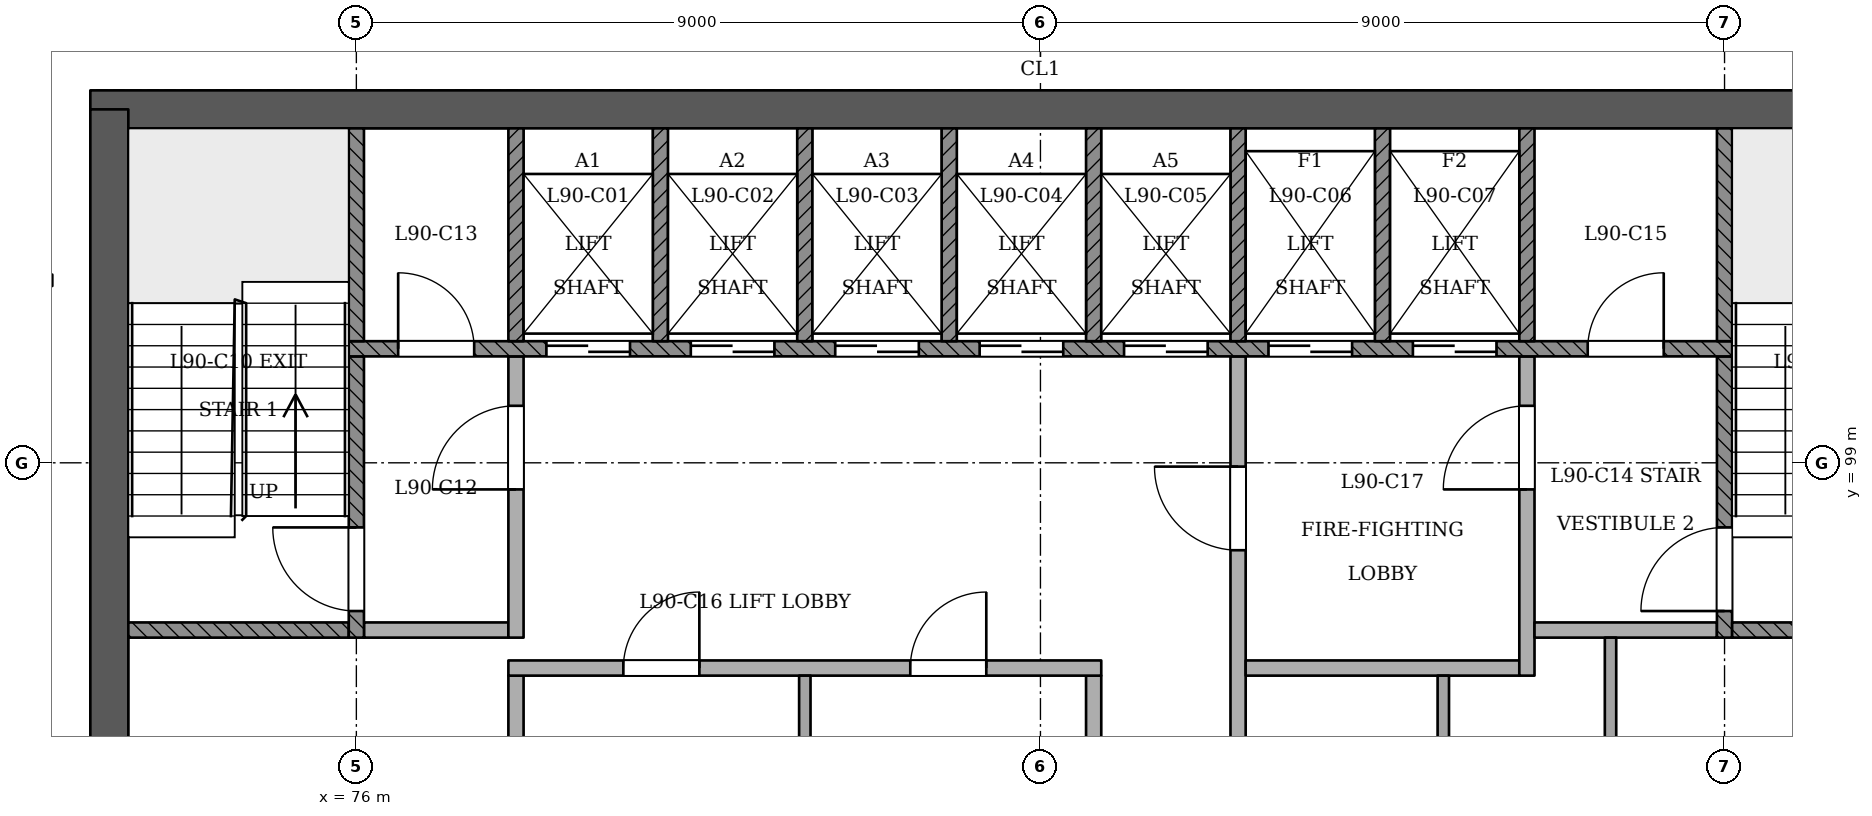
"""IFC4 building model, lengths in metres.
Left out: names, types, materials, properties, quantities, classifications, styles, units other than length and angle.
Written with IfcOpenShell. Run it as: python <this file> out.ifc"""

import sys

from ifc_helpers import new_model, si_unit, direction, frame, frame_2d, origin, place, context, subcontext, project, spatial, rectangle, extrude, element, fill, save


model = new_model("IFC4")
c1 = context("Model", 3, precision=1e-05, world=origin(), true_north=direction((0.0, 1.0)))
c2 = subcontext(c1, "Body", "Model", "MODEL_VIEW")
j1 = project(units=[si_unit("LENGTHUNIT", "METRE"), si_unit("PLANEANGLEUNIT", "RADIAN")], contexts=[c1])
p1 = place(None, origin())
s1 = spatial("IfcSite", under=j1, at=p1, CompositionType="ELEMENT")
p2 = place(p1, origin())
s2 = spatial("IfcBuilding", under=s1, at=p2, CompositionType="ELEMENT")
p3 = place(p2, frame((0.0, 0.0, 347.2)))
s3 = spatial("IfcBuildingStorey", under=s2, at=p3, CompositionType="ELEMENT", Elevation=347.2)
p4 = place(p3, frame((97.25, 103.65, 0.0), z_axis=(0.0, 0.0, 1.0), x_axis=(-1.0, 0.0, 0.0)))
e1 = element("IfcWall", 1, at=p4, inside=s3, PredefinedType="SHEAR", context=c2, shape_type="SweptSolid", body=[
    extrude(rectangle(XDim=24.75, YDim=0.5, at=frame_2d((12.375, 0.0))), origin(), (0.0, 0.0, 1.0), 3.6),
])
p5 = place(p3, frame((72.75, 103.65, 0.0), z_axis=(0.0, 0.0, 1.0), x_axis=(0.0, -1.0, 0.0)))
e2 = element("IfcWall", 2, at=p5, inside=s3, PredefinedType="SHEAR", context=c2, shape_type="SweptSolid", body=[
    extrude(rectangle(XDim=10.75, YDim=0.5, at=frame_2d((5.375, 0.0))), origin(), (0.0, 0.0, 1.0), 3.6),
])
p6 = place(p3, frame((78.1, 93.4, 0.0), z_axis=(0.0, 0.0, 1.0), x_axis=(0.0, 1.0, 0.0)))
e3 = element("IfcWall", 3, at=p6, inside=s3, PredefinedType="PARTITIONING", context=c2, shape_type="SweptSolid", body=[
    extrude(rectangle(XDim=2.8, YDim=0.2, at=frame_2d((1.4, 0.0))), origin(), (0.0, 0.0, 1.0), 3.2),
])
p7 = place(p3, frame((81.9, 93.4, 0.0), z_axis=(0.0, 0.0, 1.0), x_axis=(0.0, 1.0, 0.0)))
e4 = element("IfcWall", 4, at=p7, inside=s3, PredefinedType="PARTITIONING", context=c2, shape_type="SweptSolid", body=[
    extrude(rectangle(XDim=2.8, YDim=0.15, at=frame_2d((1.4, 0.0))), origin(), (0.0, 0.0, 1.0), 3.2),
])
p8 = place(p3, frame((85.7, 93.4, 0.0), z_axis=(0.0, 0.0, 1.0), x_axis=(0.0, 1.0, 0.0)))
e5 = element("IfcWall", 5, at=p8, inside=s3, PredefinedType="PARTITIONING", context=c2, shape_type="SweptSolid", body=[
    extrude(rectangle(XDim=2.8, YDim=0.2, at=frame_2d((1.4, 0.0))), origin(), (0.0, 0.0, 1.0), 3.2),
])
p9 = place(p3, frame((87.6, 93.4, 0.0), z_axis=(0.0, 0.0, 1.0), x_axis=(0.0, 1.0, 0.0)))
e6 = element("IfcWall", 6, at=p9, inside=s3, PredefinedType="PARTITIONING", context=c2, shape_type="SweptSolid", body=[
    extrude(rectangle(XDim=7.0, YDim=0.2, at=frame_2d((3.5, 0.0))), origin(), (0.0, 0.0, 1.0), 3.2),
])
p10 = place(p9, frame((4.45, 0.0, 0.0)))
e7 = element("IfcOpeningElement", 7, at=p10, cuts=e6, PredefinedType="OPENING", context=c2, shape_type="SweptSolid", body=[
    extrude(rectangle(XDim=1.1, YDim=2.1, at=frame_2d((0.55, 1.05))), frame((0.0, 0.11, 0.0), z_axis=(0.0, -1.0, 0.0), x_axis=(1.0, 0.0, 0.0)), (0.0, 0.0, 1.0), 0.221),
])
p11 = place(p3, frame((90.3, 93.4, 0.0), z_axis=(0.0, 0.0, 1.0), x_axis=(0.0, 1.0, 0.0)))
e8 = element("IfcWall", 8, at=p11, inside=s3, PredefinedType="PARTITIONING", context=c2, shape_type="SweptSolid", body=[
    extrude(rectangle(XDim=2.8, YDim=0.15, at=frame_2d((1.4, 0.0))), origin(), (0.0, 0.0, 1.0), 3.2),
])
p12 = place(p3, frame((92.5, 93.4, 0.0), z_axis=(0.0, 0.0, 1.0), x_axis=(0.0, 1.0, 0.0)))
e9 = element("IfcWall", 9, at=p12, inside=s3, PredefinedType="PARTITIONING", context=c2, shape_type="SweptSolid", body=[
    extrude(rectangle(XDim=3.3, YDim=0.15, at=frame_2d((1.65, 0.0))), origin(), (0.0, 0.0, 1.0), 3.2),
])
p13 = place(p3, frame((78.0, 96.3, 0.0), z_axis=(0.0, 0.0, 1.0), x_axis=(1.0, 0.0, 0.0)))
e10 = element("IfcWall", 10, at=p13, inside=s3, PredefinedType="PARTITIONING", context=c2, shape_type="SweptSolid", body=[
    extrude(rectangle(XDim=7.8, YDim=0.2, at=frame_2d((3.9, 0.0))), origin(), (0.0, 0.0, 1.0), 3.2),
])
p14 = place(p13, frame((1.512, 0.0, 0.0)))
e11 = element("IfcOpeningElement", 11, at=p14, cuts=e10, PredefinedType="OPENING", context=c2, shape_type="SweptSolid", body=[
    extrude(rectangle(XDim=1.0, YDim=2.1, at=frame_2d((0.5, 1.05))), frame((0.0, 0.11, 0.0), z_axis=(0.0, -1.0, 0.0), x_axis=(1.0, 0.0, 0.0)), (0.0, 0.0, 1.0), 0.221),
])
p15 = place(p13, frame((5.288, 0.0, 0.0)))
e12 = element("IfcOpeningElement", 12, at=p15, cuts=e10, PredefinedType="OPENING", context=c2, shape_type="SweptSolid", body=[
    extrude(rectangle(XDim=1.0, YDim=2.1, at=frame_2d((0.5, 1.05))), frame((0.0, 0.11, 0.0), z_axis=(0.0, -1.0, 0.0), x_axis=(1.0, 0.0, 0.0)), (0.0, 0.0, 1.0), 0.221),
])
p16 = place(p3, frame((87.7, 96.3, 0.0), z_axis=(0.0, 0.0, 1.0), x_axis=(1.0, 0.0, 0.0)))
e13 = element("IfcWall", 13, at=p16, inside=s3, PredefinedType="PARTITIONING", context=c2, shape_type="SweptSolid", body=[
    extrude(rectangle(XDim=3.6, YDim=0.2, at=frame_2d((1.8, 0.0))), origin(), (0.0, 0.0, 1.0), 3.2),
])
p17 = place(p3, frame((91.4, 96.2, 0.0), z_axis=(0.0, 0.0, 1.0), x_axis=(0.0, 1.0, 0.0)))
e14 = element("IfcWall", 14, at=p17, inside=s3, PredefinedType="PARTITIONING", context=c2, shape_type="SweptSolid", body=[
    extrude(rectangle(XDim=4.2, YDim=0.2, at=frame_2d((2.1, 0.0))), origin(), (0.0, 0.0, 1.0), 3.2),
])
p18 = place(p17, frame((2.45, 0.0, 0.0)))
e15 = element("IfcOpeningElement", 15, at=p18, cuts=e14, PredefinedType="OPENING", context=c2, shape_type="SweptSolid", body=[
    extrude(rectangle(XDim=1.1, YDim=2.1, at=frame_2d((0.55, 1.05))), frame((0.0, 0.11, 0.0), z_axis=(0.0, -1.0, 0.0), x_axis=(1.0, 0.0, 0.0)), (0.0, 0.0, 1.0), 0.221),
])
p19 = place(p3, frame((73.0, 96.8, 0.0), z_axis=(0.0, 0.0, 1.0), x_axis=(1.0, 0.0, 0.0)))
e16 = element("IfcWall", 16, at=p19, inside=s3, PredefinedType="SOLIDWALL", context=c2, shape_type="SweptSolid", body=[
    extrude(rectangle(XDim=2.9, YDim=0.2, at=frame_2d((1.45, 0.0))), origin(), (0.0, 0.0, 1.0), 3.2),
])
p20 = place(p3, frame((76.0, 96.7, 0.0), z_axis=(0.0, 0.0, 1.0), x_axis=(0.0, 1.0, 0.0)))
e17 = element("IfcWall", 17, at=p20, inside=s3, PredefinedType="SOLIDWALL", context=c2, shape_type="SweptSolid", body=[
    extrude(rectangle(XDim=3.7, YDim=0.2, at=frame_2d((1.85, 0.0))), origin(), (0.0, 0.0, 1.0), 3.2),
])
p21 = place(p20, frame((0.35, 0.0, 0.0)))
e18 = element("IfcOpeningElement", 18, at=p21, cuts=e17, PredefinedType="OPENING", context=c2, shape_type="SweptSolid", body=[
    extrude(rectangle(XDim=1.1, YDim=2.1, at=frame_2d((0.55, 1.05))), frame((0.0, 0.11, 0.0), z_axis=(0.0, -1.0, 0.0), x_axis=(1.0, 0.0, 0.0)), (0.0, 0.0, 1.0), 0.221),
])
p22 = place(p3, frame((76.1, 96.8, 0.0), z_axis=(0.0, 0.0, 1.0), x_axis=(1.0, 0.0, 0.0)))
e19 = element("IfcWall", 19, at=p22, inside=s3, PredefinedType="PARTITIONING", context=c2, shape_type="SweptSolid", body=[
    extrude(rectangle(XDim=1.9, YDim=0.2, at=frame_2d((0.95, 0.0))), origin(), (0.0, 0.0, 1.0), 3.2),
])
p23 = place(p3, frame((78.1, 96.7, 0.0), z_axis=(0.0, 0.0, 1.0), x_axis=(0.0, 1.0, 0.0)))
e20 = element("IfcWall", 20, at=p23, inside=s3, PredefinedType="PARTITIONING", context=c2, shape_type="SweptSolid", body=[
    extrude(rectangle(XDim=3.7, YDim=0.2, at=frame_2d((1.85, 0.0))), origin(), (0.0, 0.0, 1.0), 3.2),
])
p24 = place(p23, frame((1.95, 0.0, 0.0)))
e21 = element("IfcOpeningElement", 21, at=p24, cuts=e20, PredefinedType="OPENING", context=c2, shape_type="SweptSolid", body=[
    extrude(rectangle(XDim=1.1, YDim=2.1, at=frame_2d((0.55, 1.05))), frame((0.0, 0.11, 0.0), z_axis=(0.0, -1.0, 0.0), x_axis=(1.0, 0.0, 0.0)), (0.0, 0.0, 1.0), 0.221),
])
p25 = place(p3, frame((91.5, 96.8, 0.0), z_axis=(0.0, 0.0, 1.0), x_axis=(1.0, 0.0, 0.0)))
e22 = element("IfcWall", 22, at=p25, inside=s3, PredefinedType="PARTITIONING", context=c2, shape_type="SweptSolid", body=[
    extrude(rectangle(XDim=2.4, YDim=0.2, at=frame_2d((1.2, 0.0))), origin(), (0.0, 0.0, 1.0), 3.2),
])
p26 = place(p3, frame((94.0, 96.7, 0.0), z_axis=(0.0, 0.0, 1.0), x_axis=(0.0, 1.0, 0.0)))
e23 = element("IfcWall", 23, at=p26, inside=s3, PredefinedType="SOLIDWALL", context=c2, shape_type="SweptSolid", body=[
    extrude(rectangle(XDim=3.7, YDim=0.2, at=frame_2d((1.85, 0.0))), origin(), (0.0, 0.0, 1.0), 3.2),
])
p27 = place(p26, frame((0.35, 0.0, 0.0)))
e24 = element("IfcOpeningElement", 24, at=p27, cuts=e23, PredefinedType="OPENING", context=c2, shape_type="SweptSolid", body=[
    extrude(rectangle(XDim=1.1, YDim=2.1, at=frame_2d((0.55, 1.05))), frame((0.0, 0.11, 0.0), z_axis=(0.0, -1.0, 0.0), x_axis=(1.0, 0.0, 0.0)), (0.0, 0.0, 1.0), 0.221),
])
p28 = place(p3, frame((94.1, 96.8, 0.0), z_axis=(0.0, 0.0, 1.0), x_axis=(1.0, 0.0, 0.0)))
e25 = element("IfcWall", 25, at=p28, inside=s3, PredefinedType="SOLIDWALL", context=c2, shape_type="SweptSolid", body=[
    extrude(rectangle(XDim=2.9, YDim=0.2, at=frame_2d((1.45, 0.0))), origin(), (0.0, 0.0, 1.0), 3.2),
])
p29 = place(p3, frame((75.9, 100.5, 0.0), z_axis=(0.0, 0.0, 1.0), x_axis=(1.0, 0.0, 0.0)))
e26 = element("IfcWall", 26, at=p29, inside=s3, PredefinedType="SOLIDWALL", context=c2, shape_type="SweptSolid", body=[
    extrude(rectangle(XDim=18.2, YDim=0.2, at=frame_2d((9.1, 0.0))), origin(), (0.0, 0.0, 1.0), 3.2),
])
p30 = place(p29, frame((2.6, 0.0, 0.0)))
e27 = element("IfcOpeningElement", 27, at=p30, cuts=e26, PredefinedType="OPENING", context=c2, shape_type="SweptSolid", body=[
    extrude(rectangle(XDim=1.1, YDim=2.1, at=frame_2d((0.55, 1.05))), frame((0.0, 0.11, 0.0), z_axis=(0.0, -1.0, 0.0), x_axis=(1.0, 0.0, 0.0)), (0.0, 0.0, 1.0), 0.221),
])
p31 = place(p29, frame((4.5, 0.0, 0.0)))
e28 = element("IfcOpeningElement", 28, at=p31, cuts=e26, PredefinedType="OPENING", context=c2, shape_type="SweptSolid", body=[
    extrude(rectangle(XDim=1.1, YDim=2.1, at=frame_2d((0.55, 1.05))), frame((0.0, 0.11, 0.0), z_axis=(0.0, -1.0, 0.0), x_axis=(1.0, 0.0, 0.0)), (0.0, 0.0, 1.0), 0.221),
])
p32 = place(p29, frame((6.4, 0.0, 0.0)))
e29 = element("IfcOpeningElement", 29, at=p32, cuts=e26, PredefinedType="OPENING", context=c2, shape_type="SweptSolid", body=[
    extrude(rectangle(XDim=1.1, YDim=2.1, at=frame_2d((0.55, 1.05))), frame((0.0, 0.11, 0.0), z_axis=(0.0, -1.0, 0.0), x_axis=(1.0, 0.0, 0.0)), (0.0, 0.0, 1.0), 0.221),
])
p33 = place(p29, frame((8.3, 0.0, 0.0)))
e30 = element("IfcOpeningElement", 30, at=p33, cuts=e26, PredefinedType="OPENING", context=c2, shape_type="SweptSolid", body=[
    extrude(rectangle(XDim=1.1, YDim=2.1, at=frame_2d((0.55, 1.05))), frame((0.0, 0.11, 0.0), z_axis=(0.0, -1.0, 0.0), x_axis=(1.0, 0.0, 0.0)), (0.0, 0.0, 1.0), 0.221),
])
p34 = place(p29, frame((10.2, 0.0, 0.0)))
e31 = element("IfcOpeningElement", 31, at=p34, cuts=e26, PredefinedType="OPENING", context=c2, shape_type="SweptSolid", body=[
    extrude(rectangle(XDim=1.1, YDim=2.1, at=frame_2d((0.55, 1.05))), frame((0.0, 0.11, 0.0), z_axis=(0.0, -1.0, 0.0), x_axis=(1.0, 0.0, 0.0)), (0.0, 0.0, 1.0), 0.221),
])
p35 = place(p29, frame((12.1, 0.0, 0.0)))
e32 = element("IfcOpeningElement", 32, at=p35, cuts=e26, PredefinedType="OPENING", context=c2, shape_type="SweptSolid", body=[
    extrude(rectangle(XDim=1.1, YDim=2.1, at=frame_2d((0.55, 1.05))), frame((0.0, 0.11, 0.0), z_axis=(0.0, -1.0, 0.0), x_axis=(1.0, 0.0, 0.0)), (0.0, 0.0, 1.0), 0.221),
])
p36 = place(p29, frame((14.0, 0.0, 0.0)))
e33 = element("IfcOpeningElement", 33, at=p36, cuts=e26, PredefinedType="OPENING", context=c2, shape_type="SweptSolid", body=[
    extrude(rectangle(XDim=1.1, YDim=2.1, at=frame_2d((0.55, 1.05))), frame((0.0, 0.11, 0.0), z_axis=(0.0, -1.0, 0.0), x_axis=(1.0, 0.0, 0.0)), (0.0, 0.0, 1.0), 0.221),
])
p37 = place(p29, frame((0.65, 0.0, 0.0)))
e34 = element("IfcOpeningElement", 34, at=p37, cuts=e26, PredefinedType="OPENING", context=c2, shape_type="SweptSolid", body=[
    extrude(rectangle(XDim=1.0, YDim=2.1, at=frame_2d((0.5, 1.05))), frame((0.0, 0.11, 0.0), z_axis=(0.0, -1.0, 0.0), x_axis=(1.0, 0.0, 0.0)), (0.0, 0.0, 1.0), 0.221),
])
p38 = place(p29, frame((16.3, 0.0, 0.0)))
e35 = element("IfcOpeningElement", 35, at=p38, cuts=e26, PredefinedType="OPENING", context=c2, shape_type="SweptSolid", body=[
    extrude(rectangle(XDim=1.0, YDim=2.1, at=frame_2d((0.5, 1.05))), frame((0.0, 0.11, 0.0), z_axis=(0.0, -1.0, 0.0), x_axis=(1.0, 0.0, 0.0)), (0.0, 0.0, 1.0), 0.221),
])
for number, where, z_axis, x_axis in (
    (36, (76.0, 100.6, 0.0), (0.0, 0.0, 1.0), (0.0, 1.0, 0.0)),
    (37, (78.1, 100.6, 0.0), (0.0, 0.0, 1.0), (0.0, 1.0, 0.0)),
    (38, (80.0, 100.6, 0.0), (0.0, 0.0, 1.0), (0.0, 1.0, 0.0)),
    (39, (81.9, 100.6, 0.0), (0.0, 0.0, 1.0), (0.0, 1.0, 0.0)),
    (40, (83.8, 100.6, 0.0), (0.0, 0.0, 1.0), (0.0, 1.0, 0.0)),
    (41, (85.7, 100.6, 0.0), (0.0, 0.0, 1.0), (0.0, 1.0, 0.0)),
    (42, (87.6, 100.6, 0.0), (0.0, 0.0, 1.0), (0.0, 1.0, 0.0)),
    (43, (89.5, 100.6, 0.0), (0.0, 0.0, 1.0), (0.0, 1.0, 0.0)),
    (44, (91.4, 100.6, 0.0), (0.0, 0.0, 1.0), (0.0, 1.0, 0.0)),
    (45, (94.0, 100.6, 0.0), (0.0, 0.0, 1.0), (0.0, 1.0, 0.0)),
):
    element("IfcWall", number, at=place(p3, frame(where, z_axis=z_axis, x_axis=x_axis)), inside=s3, PredefinedType="SOLIDWALL", context=c2, shape_type="SweptSolid", body=[
        extrude(rectangle(XDim=2.8, YDim=0.2, at=frame_2d((1.4, 0.0))), origin(), (0.0, 0.0, 1.0), 3.2),
    ])
p39 = place(p30, origin())
e46 = element("IfcDoor", 46, at=p39, inside=s3, OperationType="SLIDING_TO_RIGHT", PredefinedType="NOTDEFINED", context=c2, shape_type="SweptSolid", body=[
    extrude(rectangle(XDim=1.1, YDim=2.1, at=frame_2d((0.55, 1.05))), frame((0.0, 0.025, 0.0), z_axis=(0.0, -1.0, 0.0), x_axis=(1.0, 0.0, 0.0)), (0.0, 0.0, 1.0), 0.05),
])
fill(e27, e46)
p40 = place(p31, origin())
e47 = element("IfcDoor", 47, at=p40, inside=s3, OperationType="SLIDING_TO_LEFT", PredefinedType="NOTDEFINED", context=c2, shape_type="SweptSolid", body=[
    extrude(rectangle(XDim=1.1, YDim=2.1, at=frame_2d((0.55, 1.05))), frame((0.0, 0.025, 0.0), z_axis=(0.0, -1.0, 0.0), x_axis=(1.0, 0.0, 0.0)), (0.0, 0.0, 1.0), 0.05),
])
fill(e28, e47)
p41 = place(p32, origin())
e48 = element("IfcDoor", 48, at=p41, inside=s3, OperationType="SLIDING_TO_RIGHT", PredefinedType="NOTDEFINED", context=c2, shape_type="SweptSolid", body=[
    extrude(rectangle(XDim=1.1, YDim=2.1, at=frame_2d((0.55, 1.05))), frame((0.0, 0.025, 0.0), z_axis=(0.0, -1.0, 0.0), x_axis=(1.0, 0.0, 0.0)), (0.0, 0.0, 1.0), 0.05),
])
fill(e29, e48)
p42 = place(p33, origin())
e49 = element("IfcDoor", 49, at=p42, inside=s3, OperationType="SLIDING_TO_LEFT", PredefinedType="NOTDEFINED", context=c2, shape_type="SweptSolid", body=[
    extrude(rectangle(XDim=1.1, YDim=2.1, at=frame_2d((0.55, 1.05))), frame((0.0, 0.025, 0.0), z_axis=(0.0, -1.0, 0.0), x_axis=(1.0, 0.0, 0.0)), (0.0, 0.0, 1.0), 0.05),
])
fill(e30, e49)
p43 = place(p34, origin())
e50 = element("IfcDoor", 50, at=p43, inside=s3, OperationType="SLIDING_TO_RIGHT", PredefinedType="NOTDEFINED", context=c2, shape_type="SweptSolid", body=[
    extrude(rectangle(XDim=1.1, YDim=2.1, at=frame_2d((0.55, 1.05))), frame((0.0, 0.025, 0.0), z_axis=(0.0, -1.0, 0.0), x_axis=(1.0, 0.0, 0.0)), (0.0, 0.0, 1.0), 0.05),
])
fill(e31, e50)
p44 = place(p35, origin())
e51 = element("IfcDoor", 51, at=p44, inside=s3, OperationType="SLIDING_TO_RIGHT", PredefinedType="NOTDEFINED", context=c2, shape_type="SweptSolid", body=[
    extrude(rectangle(XDim=1.1, YDim=2.1, at=frame_2d((0.55, 1.05))), frame((0.0, 0.025, 0.0), z_axis=(0.0, -1.0, 0.0), x_axis=(1.0, 0.0, 0.0)), (0.0, 0.0, 1.0), 0.05),
])
fill(e32, e51)
p45 = place(p36, origin())
e52 = element("IfcDoor", 52, at=p45, inside=s3, OperationType="SLIDING_TO_LEFT", PredefinedType="NOTDEFINED", context=c2, shape_type="SweptSolid", body=[
    extrude(rectangle(XDim=1.1, YDim=2.1, at=frame_2d((0.55, 1.05))), frame((0.0, 0.025, 0.0), z_axis=(0.0, -1.0, 0.0), x_axis=(1.0, 0.0, 0.0)), (0.0, 0.0, 1.0), 0.05),
])
fill(e33, e52)
p46 = place(p21, origin())
e53 = element("IfcDoor", 53, at=p46, inside=s3, OperationType="SINGLE_SWING_RIGHT", PredefinedType="NOTDEFINED", context=c2, shape_type="SweptSolid", body=[
    extrude(rectangle(XDim=1.1, YDim=2.1, at=frame_2d((0.55, 1.05))), frame((0.0, 0.025, 0.0), z_axis=(0.0, -1.0, 0.0), x_axis=(1.0, 0.0, 0.0)), (0.0, 0.0, 1.0), 0.05),
])
fill(e18, e53)
p47 = place(p27, origin())
e54 = element("IfcDoor", 54, at=p47, inside=s3, OperationType="SINGLE_SWING_LEFT", PredefinedType="NOTDEFINED", context=c2, shape_type="SweptSolid", body=[
    extrude(rectangle(XDim=1.1, YDim=2.1, at=frame_2d((0.55, 1.05))), frame((0.0, 0.025, 0.0), z_axis=(0.0, -1.0, 0.0), x_axis=(1.0, 0.0, 0.0)), (0.0, 0.0, 1.0), 0.05),
])
fill(e24, e54)
p48 = place(p24, origin())
e55 = element("IfcDoor", 55, at=p48, inside=s3, OperationType="SINGLE_SWING_LEFT", PredefinedType="NOTDEFINED", context=c2, shape_type="SweptSolid", body=[
    extrude(rectangle(XDim=1.1, YDim=2.1, at=frame_2d((0.55, 1.05))), frame((0.0, 0.025, 0.0), z_axis=(0.0, -1.0, 0.0), x_axis=(1.0, 0.0, 0.0)), (0.0, 0.0, 1.0), 0.05),
])
fill(e21, e55)
p49 = place(p10, origin())
e56 = element("IfcDoor", 56, at=p49, inside=s3, OperationType="SINGLE_SWING_RIGHT", PredefinedType="NOTDEFINED", context=c2, shape_type="SweptSolid", body=[
    extrude(rectangle(XDim=1.1, YDim=2.1, at=frame_2d((0.55, 1.05))), frame((0.0, 0.025, 0.0), z_axis=(0.0, -1.0, 0.0), x_axis=(1.0, 0.0, 0.0)), (0.0, 0.0, 1.0), 0.05),
])
fill(e7, e56)
p50 = place(p18, origin())
e57 = element("IfcDoor", 57, at=p50, inside=s3, OperationType="SINGLE_SWING_LEFT", PredefinedType="NOTDEFINED", context=c2, shape_type="SweptSolid", body=[
    extrude(rectangle(XDim=1.1, YDim=2.1, at=frame_2d((0.55, 1.05))), frame((0.0, 0.025, 0.0), z_axis=(0.0, -1.0, 0.0), x_axis=(1.0, 0.0, 0.0)), (0.0, 0.0, 1.0), 0.05),
])
fill(e15, e57)
p51 = place(p37, origin())
e58 = element("IfcDoor", 58, at=p51, inside=s3, OperationType="SINGLE_SWING_LEFT", PredefinedType="NOTDEFINED", context=c2, shape_type="SweptSolid", body=[
    extrude(rectangle(XDim=1.0, YDim=2.1, at=frame_2d((0.5, 1.05))), frame((0.0, 0.025, 0.0), z_axis=(0.0, -1.0, 0.0), x_axis=(1.0, 0.0, 0.0)), (0.0, 0.0, 1.0), 0.05),
])
fill(e34, e58)
p52 = place(p38, origin())
e59 = element("IfcDoor", 59, at=p52, inside=s3, OperationType="SINGLE_SWING_RIGHT", PredefinedType="NOTDEFINED", context=c2, shape_type="SweptSolid", body=[
    extrude(rectangle(XDim=1.0, YDim=2.1, at=frame_2d((0.5, 1.05))), frame((0.0, 0.025, 0.0), z_axis=(0.0, -1.0, 0.0), x_axis=(1.0, 0.0, 0.0)), (0.0, 0.0, 1.0), 0.05),
])
fill(e35, e59)
p53 = place(p14, origin())
e60 = element("IfcDoor", 60, at=p53, inside=s3, OperationType="SINGLE_SWING_RIGHT", PredefinedType="NOTDEFINED", context=c2, shape_type="SweptSolid", body=[
    extrude(rectangle(XDim=1.0, YDim=2.1, at=frame_2d((0.5, 1.05))), frame((0.0, 0.025, 0.0), z_axis=(0.0, -1.0, 0.0), x_axis=(1.0, 0.0, 0.0)), (0.0, 0.0, 1.0), 0.05),
])
fill(e11, e60)
p54 = place(p15, origin())
e61 = element("IfcDoor", 61, at=p54, inside=s3, OperationType="SINGLE_SWING_RIGHT", PredefinedType="NOTDEFINED", context=c2, shape_type="SweptSolid", body=[
    extrude(rectangle(XDim=1.0, YDim=2.1, at=frame_2d((0.5, 1.05))), frame((0.0, 0.025, 0.0), z_axis=(0.0, -1.0, 0.0), x_axis=(1.0, 0.0, 0.0)), (0.0, 0.0, 1.0), 0.05),
])
fill(e12, e61)
save(model, sys.argv[1])
